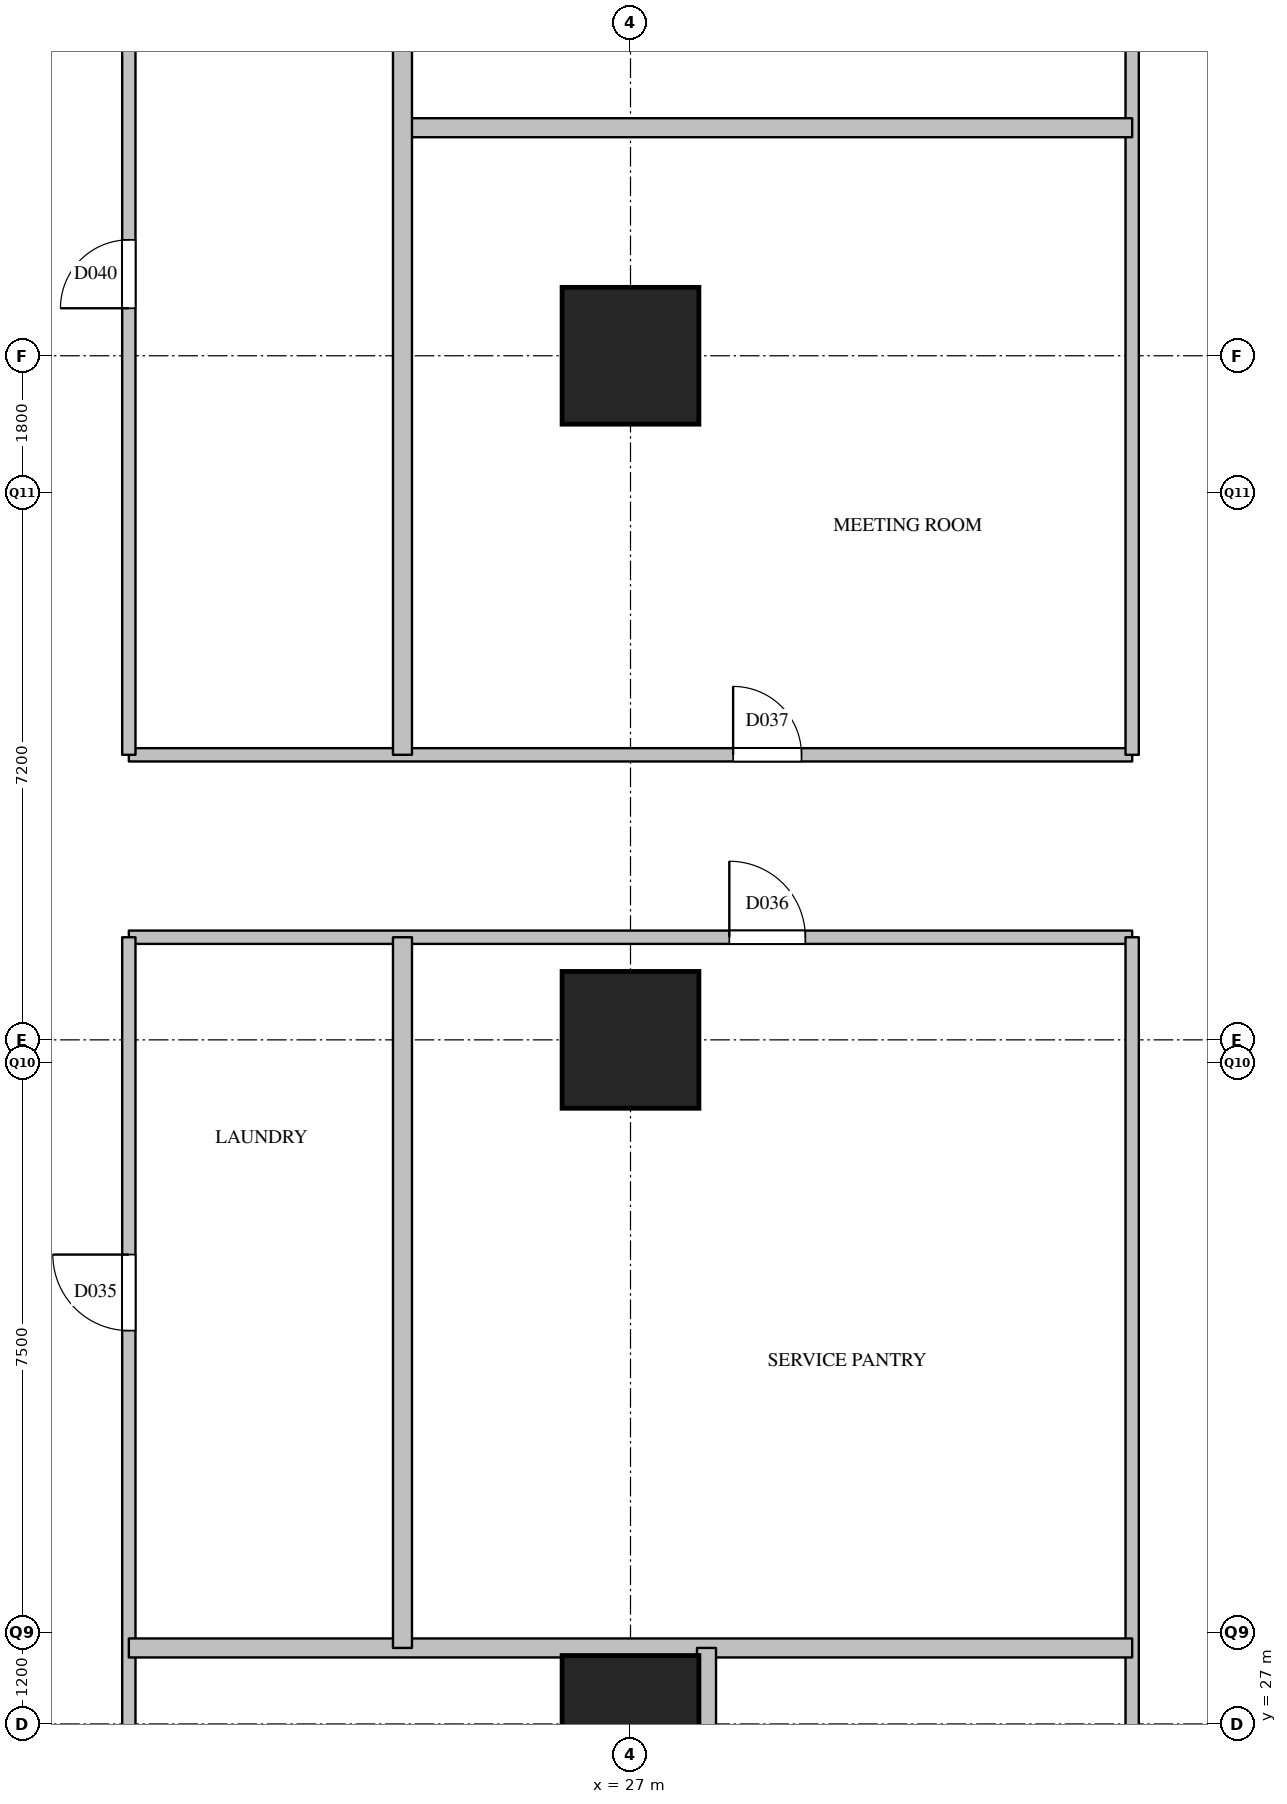
"""IFC4 building model, lengths in metres.
Left out: names, types, materials, properties, quantities, classifications, styles, units other than length and angle.
Written with IfcOpenShell. Run it as: python <this file> out.ifc"""

import sys

from ifc_helpers import new_model, si_unit, direction, frame, frame_2d, origin, origin_2d, place, context, subcontext, project, spatial, rectangle, extrude, element, fill, save


model = new_model("IFC4")
c1 = context("Model", 3, precision=1e-05, world=origin(), true_north=direction((0.0, 1.0)))
c2 = subcontext(c1, "Body", "Model", "MODEL_VIEW")
j1 = project(units=[si_unit("LENGTHUNIT", "METRE"), si_unit("PLANEANGLEUNIT", "RADIAN")], contexts=[c1])
p1 = place(None, origin())
s1 = spatial("IfcSite", under=j1, at=p1, CompositionType="ELEMENT")
p2 = place(p1, origin())
s2 = spatial("IfcBuilding", under=s1, at=p2, CompositionType="ELEMENT")
p3 = place(p2, frame((0.0, 0.0, 38.6)))
s3 = spatial("IfcBuildingStorey", under=s2, at=p3, CompositionType="ELEMENT", Elevation=38.6)
for number, where, z_axis, x_axis in (
    (1, (27.0, 27.0, 0.0), (0.0, 0.0, 1.0), (1.0, 0.0, 0.0)),
    (2, (27.0, 36.0, 0.0), (0.0, 0.0, 1.0), (1.0, 0.0, 0.0)),
    (3, (27.0, 45.0, 0.0), (0.0, 0.0, 1.0), (1.0, 0.0, 0.0)),
):
    element("IfcColumn", number, at=place(p3, frame(where, z_axis=z_axis, x_axis=x_axis)), inside=s3, PredefinedType="COLUMN", context=c2, shape_type="SweptSolid", body=[
        extrude(rectangle(XDim=1.8, YDim=1.8, at=origin_2d()), origin(), (0.0, 0.0, 1.0), 3.8),
    ])
p4 = place(p3, frame((20.4, 37.35, 0.0), z_axis=(0.0, 0.0, 1.0), x_axis=(1.0, 0.0, 0.0)))
e4 = element("IfcWall", 4, at=p4, inside=s3, PredefinedType="PARTITIONING", context=c2, shape_type="SweptSolid", body=[
    extrude(rectangle(XDim=13.2, YDim=0.175, at=frame_2d((6.6, 0.0))), origin(), (0.0, 0.0, 1.0), 2.5),
])
p5 = place(p4, frame((7.9, 0.0, 0.0)))
e5 = element("IfcOpeningElement", 5, at=p5, cuts=e4, PredefinedType="OPENING", context=c2, shape_type="SweptSolid", body=[
    extrude(rectangle(XDim=1.0, YDim=2.1, at=frame_2d((0.5, 1.05))), frame((0.0, 0.097, 0.0), z_axis=(0.0, -1.0, 0.0), x_axis=(1.0, 0.0, 0.0)), (0.0, 0.0, 1.0), 0.195),
])
p6 = place(p3, frame((20.4, 39.75, 0.0), z_axis=(0.0, 0.0, 1.0), x_axis=(1.0, 0.0, 0.0)))
e6 = element("IfcWall", 6, at=p6, inside=s3, PredefinedType="PARTITIONING", context=c2, shape_type="SweptSolid", body=[
    extrude(rectangle(XDim=13.2, YDim=0.175, at=frame_2d((6.6, 0.0))), origin(), (0.0, 0.0, 1.0), 2.5),
])
p7 = place(p6, frame((7.95, 0.0, 0.0)))
e7 = element("IfcOpeningElement", 7, at=p7, cuts=e6, PredefinedType="OPENING", context=c2, shape_type="SweptSolid", body=[
    extrude(rectangle(XDim=0.9, YDim=2.1, at=frame_2d((0.45, 1.05))), frame((0.0, 0.097, 0.0), z_axis=(0.0, -1.0, 0.0), x_axis=(1.0, 0.0, 0.0)), (0.0, 0.0, 1.0), 0.195),
])
p8 = place(p3, frame((20.4, 26.1, 0.0), z_axis=(0.0, 0.0, 1.0), x_axis=(0.0, 1.0, 0.0)))
e8 = element("IfcWall", 8, at=p8, inside=s3, PredefinedType="PARTITIONING", context=c2, shape_type="SweptSolid", body=[
    extrude(rectangle(XDim=11.25, YDim=0.175, at=frame_2d((5.625, 0.0))), origin(), (0.0, 0.0, 1.0), 2.5),
])
p9 = place(p8, frame((6.075, 0.0, 0.0)))
e9 = element("IfcOpeningElement", 9, at=p9, cuts=e8, PredefinedType="OPENING", context=c2, shape_type="SweptSolid", body=[
    extrude(rectangle(XDim=1.0, YDim=2.1, at=frame_2d((0.5, 1.05))), frame((0.0, 0.097, 0.0), z_axis=(0.0, -1.0, 0.0), x_axis=(1.0, 0.0, 0.0)), (0.0, 0.0, 1.0), 0.195),
])
p10 = place(p3, frame((20.4, 39.75, 0.0), z_axis=(0.0, 0.0, 1.0), x_axis=(0.0, 1.0, 0.0)))
e10 = element("IfcWall", 10, at=p10, inside=s3, PredefinedType="PARTITIONING", context=c2, shape_type="SweptSolid", body=[
    extrude(rectangle(XDim=12.65, YDim=0.175, at=frame_2d((6.325, 0.0))), origin(), (0.0, 0.0, 1.0), 3.5),
])
p11 = place(p10, frame((5.875, 0.0, 0.0)))
e11 = element("IfcOpeningElement", 11, at=p11, cuts=e10, PredefinedType="OPENING", context=c2, shape_type="SweptSolid", body=[
    extrude(rectangle(XDim=0.9, YDim=2.1, at=frame_2d((0.45, 1.05))), frame((0.0, 0.097, 0.0), z_axis=(0.0, -1.0, 0.0), x_axis=(1.0, 0.0, 0.0)), (0.0, 0.0, 1.0), 0.195),
])
p12 = place(p3, frame((33.6, 26.1, 0.0), z_axis=(0.0, 0.0, 1.0), x_axis=(0.0, 1.0, 0.0)))
e12 = element("IfcWall", 12, at=p12, inside=s3, PredefinedType="PARTITIONING", context=c2, shape_type="SweptSolid", body=[
    extrude(rectangle(XDim=11.25, YDim=0.175, at=frame_2d((5.625, 0.0))), origin(), (0.0, 0.0, 1.0), 2.5),
])
p13 = place(p3, frame((33.6, 39.75, 0.0), z_axis=(0.0, 0.0, 1.0), x_axis=(0.0, 1.0, 0.0)))
e13 = element("IfcWall", 13, at=p13, inside=s3, PredefinedType="PARTITIONING", context=c2, shape_type="SweptSolid", body=[
    extrude(rectangle(XDim=12.65, YDim=0.175, at=frame_2d((6.325, 0.0))), origin(), (0.0, 0.0, 1.0), 3.5),
])
p14 = place(p13, frame((10.0, 0.0, 0.0)))
e14 = element("IfcOpeningElement", 14, at=p14, cuts=e13, PredefinedType="OPENING", context=c2, shape_type="SweptSolid", body=[
    extrude(rectangle(XDim=0.9, YDim=2.1, at=frame_2d((0.45, 1.05))), frame((0.0, 0.097, 0.0), z_axis=(0.0, -1.0, 0.0), x_axis=(1.0, 0.0, 0.0)), (0.0, 0.0, 1.0), 0.195),
])
p15 = place(p3, frame((20.4, 28.0, 0.0), z_axis=(0.0, 0.0, 1.0), x_axis=(1.0, 0.0, 0.0)))
e15 = element("IfcWall", 15, at=p15, inside=s3, PredefinedType="PARTITIONING", context=c2, shape_type="SweptSolid", body=[
    extrude(rectangle(XDim=13.2, YDim=0.25, at=frame_2d((6.6, 0.0))), origin(), (0.0, 0.0, 1.0), 2.5),
])
p16 = place(p3, frame((24.0, 48.0, 0.0), z_axis=(0.0, 0.0, 1.0), x_axis=(1.0, 0.0, 0.0)))
e16 = element("IfcWall", 16, at=p16, inside=s3, PredefinedType="PARTITIONING", context=c2, shape_type="SweptSolid", body=[
    extrude(rectangle(XDim=9.6, YDim=0.25, at=frame_2d((4.8, 0.0))), origin(), (0.0, 0.0, 1.0), 2.5),
])
p17 = place(p3, frame((24.0, 28.0, 0.0), z_axis=(0.0, 0.0, 1.0), x_axis=(0.0, 1.0, 0.0)))
e17 = element("IfcWall", 17, at=p17, inside=s3, PredefinedType="PARTITIONING", context=c2, shape_type="SweptSolid", body=[
    extrude(rectangle(XDim=9.35, YDim=0.25, at=frame_2d((4.675, 0.0))), origin(), (0.0, 0.0, 1.0), 3.5),
])
p18 = place(p3, frame((24.0, 39.75, 0.0), z_axis=(0.0, 0.0, 1.0), x_axis=(0.0, 1.0, 0.0)))
e18 = element("IfcWall", 18, at=p18, inside=s3, PredefinedType="PARTITIONING", context=c2, shape_type="SweptSolid", body=[
    extrude(rectangle(XDim=14.25, YDim=0.25, at=frame_2d((7.125, 0.0))), origin(), (0.0, 0.0, 1.0), 2.5),
])
p19 = place(p3, frame((28.0, 20.0, 0.0), z_axis=(0.0, 0.0, 1.0), x_axis=(0.0, 1.0, 0.0)))
e19 = element("IfcWall", 19, at=p19, inside=s3, PredefinedType="PARTITIONING", context=c2, shape_type="SweptSolid", body=[
    extrude(rectangle(XDim=8.0, YDim=0.25, at=frame_2d((4.0, 0.0))), origin(), (0.0, 0.0, 1.0), 2.5),
])
p20 = place(p9, origin())
e20 = element("IfcDoor", 20, at=p20, inside=s3, OperationType="SINGLE_SWING_RIGHT", PredefinedType="DOOR", context=c2, shape_type="SweptSolid", body=[
    extrude(rectangle(XDim=1.0, YDim=2.1, at=frame_2d((0.5, 1.05))), frame((0.0, 0.025, 0.0), z_axis=(0.0, -1.0, 0.0), x_axis=(1.0, 0.0, 0.0)), (0.0, 0.0, 1.0), 0.05),
])
fill(e9, e20)
p21 = place(p5, origin())
e21 = element("IfcDoor", 21, at=p21, inside=s3, OperationType="SINGLE_SWING_LEFT", PredefinedType="DOOR", context=c2, shape_type="SweptSolid", body=[
    extrude(rectangle(XDim=1.0, YDim=2.1, at=frame_2d((0.5, 1.05))), frame((0.0, 0.025, 0.0), z_axis=(0.0, -1.0, 0.0), x_axis=(1.0, 0.0, 0.0)), (0.0, 0.0, 1.0), 0.05),
])
fill(e5, e21)
p22 = place(p7, origin())
e22 = element("IfcDoor", 22, at=p22, inside=s3, OperationType="SINGLE_SWING_LEFT", PredefinedType="DOOR", context=c2, shape_type="SweptSolid", body=[
    extrude(rectangle(XDim=0.9, YDim=2.1, at=frame_2d((0.45, 1.05))), frame((0.0, 0.025, 0.0), z_axis=(0.0, -1.0, 0.0), x_axis=(1.0, 0.0, 0.0)), (0.0, 0.0, 1.0), 0.05),
])
fill(e7, e22)
p23 = place(p11, origin())
e23 = element("IfcDoor", 23, at=p23, inside=s3, OperationType="SINGLE_SWING_LEFT", PredefinedType="DOOR", context=c2, shape_type="SweptSolid", body=[
    extrude(rectangle(XDim=0.9, YDim=2.1, at=frame_2d((0.45, 1.05))), frame((0.0, 0.025, 0.0), z_axis=(0.0, -1.0, 0.0), x_axis=(1.0, 0.0, 0.0)), (0.0, 0.0, 1.0), 0.05),
])
fill(e11, e23)
save(model, sys.argv[1])
